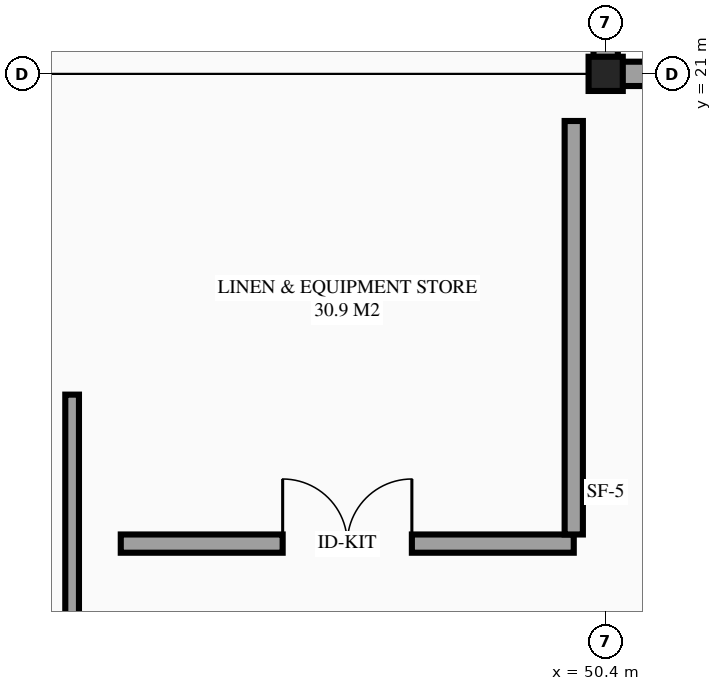
"""IFC4 building model, lengths in metres.
Left out: names, types, materials, properties, quantities, classifications, styles, units other than length and angle.
Written with IfcOpenShell. Run it as: python <this file> out.ifc"""

import sys

from ifc_helpers import new_model, si_unit, direction, frame, frame_2d, origin, origin_2d, place, context, subcontext, project, spatial, rectangle, extrude, element, fill, save


model = new_model("IFC4")
c1 = context("Model", 3, precision=1e-05, world=origin(), true_north=direction((0.0, 1.0)))
c2 = subcontext(c1, "Body", "Model", "MODEL_VIEW")
j1 = project(units=[si_unit("LENGTHUNIT", "METRE"), si_unit("PLANEANGLEUNIT", "RADIAN")], contexts=[c1])
p1 = place(None, origin())
s1 = spatial("IfcSite", under=j1, at=p1, CompositionType="ELEMENT")
p2 = place(p1, origin())
s2 = spatial("IfcBuilding", under=s1, at=p2, CompositionType="ELEMENT")
p3 = place(p2, frame((0.0, 0.0, 43.5)))
s3 = spatial("IfcBuildingStorey", under=s2, at=p3, CompositionType="ELEMENT", Elevation=43.5)
p4 = place(p3, frame((50.4, 21.0, 0.0), z_axis=(0.0, 0.0, 1.0), x_axis=(1.0, 0.0, 0.0)))
e1 = element("IfcColumn", 1, at=p4, inside=s3, PredefinedType="COLUMN", context=c2, shape_type="SweptSolid", body=[
    extrude(rectangle(XDim=0.45, YDim=0.45, at=origin_2d()), origin(), (0.0, 0.0, 1.0), 3.6),
])
p5 = place(p3, frame((50.4, 21.0, 0.0), z_axis=(0.0, 0.0, 1.0), x_axis=(0.0, 1.0, 0.0)))
e2 = element("IfcWall", 2, at=p5, inside=s3, PredefinedType="STANDARD", context=c2, shape_type="SweptSolid", body=[
    extrude(rectangle(XDim=25.2, YDim=0.32, at=frame_2d((12.6, 0.0))), origin(), (0.0, 0.0, 1.0), 2.51),
])
p6 = place(p5, frame((2.4, 0.0, 0.85)))
e3 = element("IfcOpeningElement", 3, at=p6, cuts=e2, PredefinedType="OPENING", context=c2, shape_type="SweptSolid", body=[
    extrude(rectangle(XDim=1.5, YDim=1.5, at=frame_2d((0.75, 0.75))), frame((0.0, 0.17, 0.0), z_axis=(0.0, -1.0, 0.0), x_axis=(1.0, 0.0, 0.0)), (0.0, 0.0, 1.0), 0.34),
])
p7 = place(p5, frame((9.15, 0.0, 0.85)))
e4 = element("IfcOpeningElement", 4, at=p7, cuts=e2, PredefinedType="OPENING", context=c2, shape_type="SweptSolid", body=[
    extrude(rectangle(XDim=1.5, YDim=1.5, at=frame_2d((0.75, 0.75))), frame((0.0, 0.17, 0.0), z_axis=(0.0, -1.0, 0.0), x_axis=(1.0, 0.0, 0.0)), (0.0, 0.0, 1.0), 0.34),
])
p8 = place(p5, frame((17.9, 0.0, 0.85)))
e5 = element("IfcOpeningElement", 5, at=p8, cuts=e2, PredefinedType="OPENING", context=c2, shape_type="SweptSolid", body=[
    extrude(rectangle(XDim=1.5, YDim=1.5, at=frame_2d((0.75, 0.75))), frame((0.0, 0.17, 0.0), z_axis=(0.0, -1.0, 0.0), x_axis=(1.0, 0.0, 0.0)), (0.0, 0.0, 1.0), 0.34),
])
p9 = place(p5, frame((22.4, 0.0, 0.85)))
e6 = element("IfcOpeningElement", 6, at=p9, cuts=e2, PredefinedType="OPENING", context=c2, shape_type="SweptSolid", body=[
    extrude(rectangle(XDim=1.5, YDim=1.5, at=frame_2d((0.75, 0.75))), frame((0.0, 0.17, 0.0), z_axis=(0.0, -1.0, 0.0), x_axis=(1.0, 0.0, 0.0)), (0.0, 0.0, 1.0), 0.34),
])
p10 = place(p3, frame((43.38, 12.91, 0.0), z_axis=(0.0, 0.0, 1.0), x_axis=(0.0, 1.0, 0.0)))
e7 = element("IfcWall", 7, at=p10, inside=s3, PredefinedType="PARTITIONING", context=c2, shape_type="SweptSolid", body=[
    extrude(rectangle(XDim=3.87, YDim=0.18, at=frame_2d((1.935, 0.0))), origin(), (0.0, 0.0, 1.0), 3.355),
])
p11 = place(p3, frame((44.02, 14.82, 0.0), z_axis=(0.0, 0.0, 1.0), x_axis=(1.0, 0.0, 0.0)))
e8 = element("IfcWall", 8, at=p11, inside=s3, PredefinedType="PARTITIONING", context=c2, shape_type="SweptSolid", body=[
    extrude(rectangle(XDim=5.96, YDim=0.24, at=frame_2d((2.98, 0.0))), origin(), (0.0, 0.0, 1.0), 3.355),
])
p12 = place(p11, frame((2.13, 0.0, 0.0)))
e9 = element("IfcOpeningElement", 9, at=p12, cuts=e8, PredefinedType="OPENING", context=c2, shape_type="SweptSolid", body=[
    extrude(rectangle(XDim=1.7, YDim=2.2, at=frame_2d((0.85, 1.1))), frame((0.0, 0.13, 0.0), z_axis=(0.0, -1.0, 0.0), x_axis=(1.0, 0.0, 0.0)), (0.0, 0.0, 1.0), 0.26),
])
p13 = place(p3, frame((49.98, 14.94, 0.0), z_axis=(0.0, 0.0, 1.0), x_axis=(0.0, 1.0, 0.0)))
e10 = element("IfcWall", 10, at=p13, inside=s3, PredefinedType="PARTITIONING", context=c2, shape_type="SweptSolid", body=[
    extrude(rectangle(XDim=5.44, YDim=0.24, at=frame_2d((2.72, 0.0))), origin(), (0.0, 0.0, 1.0), 3.355),
])
p14 = place(p3, frame((58.8, 21.0, 0.0), z_axis=(0.0, 0.0, 1.0), x_axis=(-1.0, 0.0, 0.0)))
e11 = element("IfcWall", 11, at=p14, inside=s3, PredefinedType="STANDARD", context=c2, shape_type="SweptSolid", body=[
    extrude(rectangle(XDim=8.4, YDim=0.32, at=frame_2d((4.2, 0.0))), origin(), (0.0, 0.0, 1.0), 3.05),
])
p15 = place(p14, frame((3.15, 0.0, 0.75)))
e12 = element("IfcOpeningElement", 12, at=p15, cuts=e11, PredefinedType="OPENING", context=c2, shape_type="SweptSolid", body=[
    extrude(rectangle(XDim=2.1, YDim=1.5, at=frame_2d((1.05, 0.75))), frame((0.0, 0.17, 0.0), z_axis=(0.0, -1.0, 0.0), x_axis=(1.0, 0.0, 0.0)), (0.0, 0.0, 1.0), 0.34),
])
p16 = place(p12, origin())
e13 = element("IfcDoor", 13, at=p16, inside=s3, OperationType="DOUBLE_DOOR_SINGLE_SWING", PredefinedType="DOOR", context=c2, shape_type="SweptSolid", body=[
    extrude(rectangle(XDim=1.7, YDim=2.2, at=frame_2d((0.85, 1.1))), frame((0.0, 0.025, 0.0), z_axis=(0.0, -1.0, 0.0), x_axis=(1.0, 0.0, 0.0)), (0.0, 0.0, 1.0), 0.05),
])
fill(e9, e13)
save(model, sys.argv[1])
